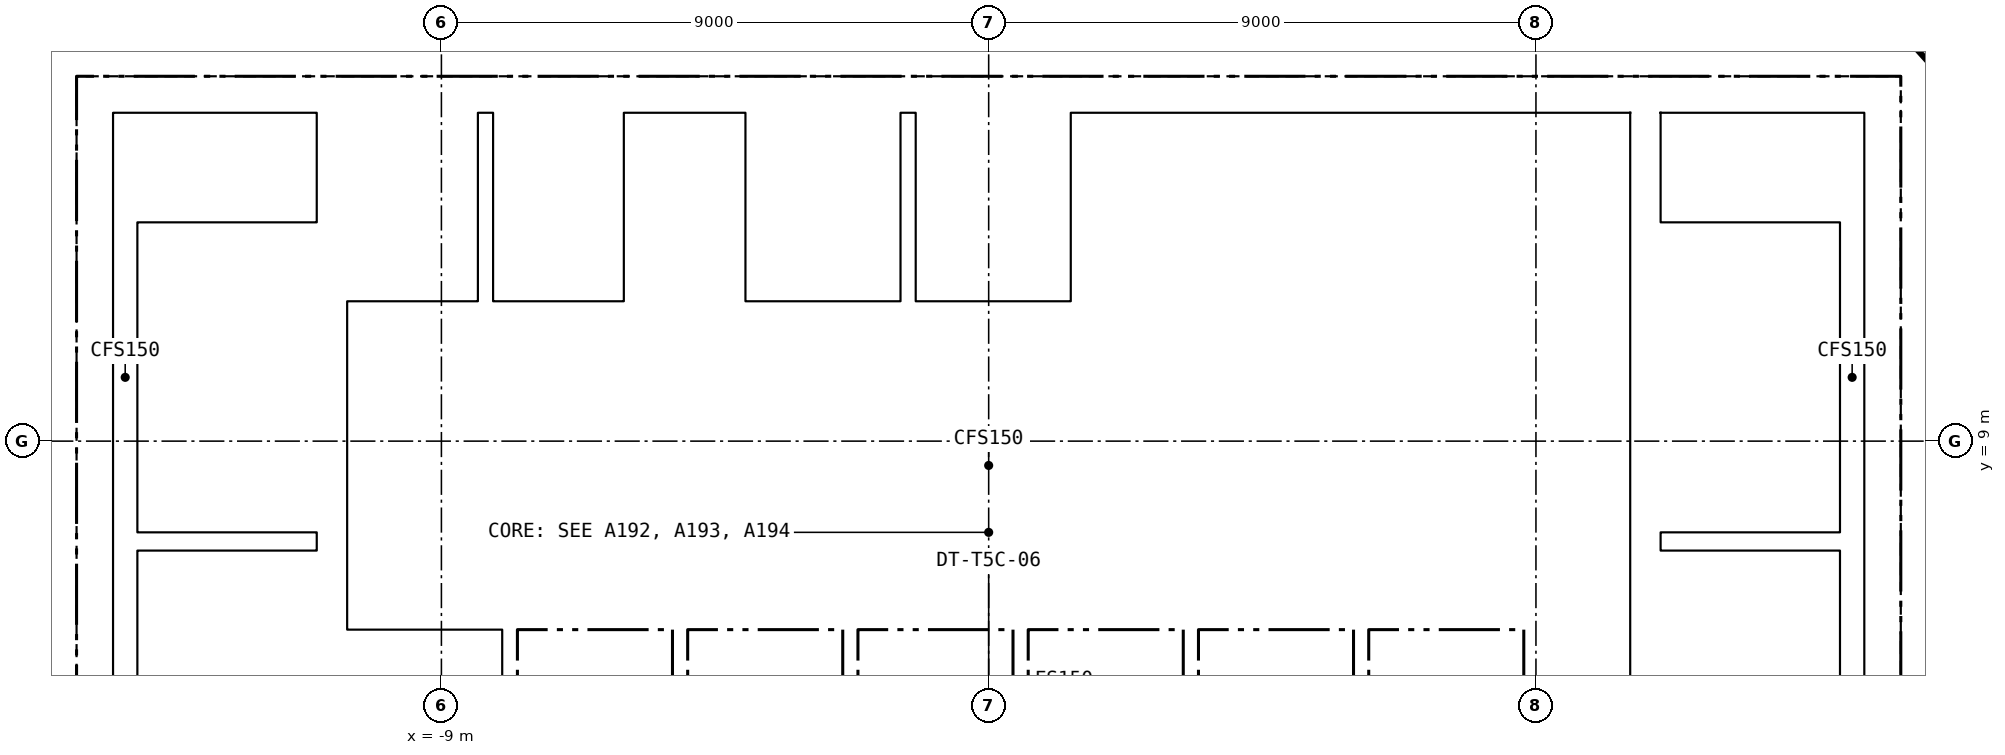
"""IFC4 building model, lengths in metres.
Left out: names, types, materials, properties, quantities, classifications, styles, units other than length and angle.
Written with IfcOpenShell. Run it as: python <this file> out.ifc"""

import sys

from ifc_helpers import new_model, si_unit, direction, frame, frame_2d, origin, place, context, subcontext, project, spatial, rectangle, extrude, element, fill, save


model = new_model("IFC4")
c1 = context("Model", 3, precision=1e-05, world=origin(), true_north=direction((0.0, 1.0)))
c2 = subcontext(c1, "Body", "Model", "MODEL_VIEW")
j1 = project(units=[si_unit("LENGTHUNIT", "METRE"), si_unit("PLANEANGLEUNIT", "RADIAN")], contexts=[c1])
p1 = place(None, origin())
s1 = spatial("IfcSite", under=j1, at=p1, CompositionType="ELEMENT")
p2 = place(p1, origin())
s2 = spatial("IfcBuilding", under=s1, at=p2, CompositionType="ELEMENT")
p3 = place(p2, frame((0.0, 0.0, 238.2)))
s3 = spatial("IfcBuildingStorey", under=s2, at=p3, CompositionType="ELEMENT", Elevation=238.2)
p4 = place(p3, frame((-15.0, 14.7, -0.15), z_axis=(0.0, 0.0, 1.0), x_axis=(1.0, 0.0, 0.0)))
e1 = element("IfcWall", 1, at=p4, inside=s3, PredefinedType="SOLIDWALL", context=c2, shape_type="SweptSolid", body=[
    extrude(rectangle(XDim=30.0, YDim=0.6, at=frame_2d((15.0, 0.0))), origin(), (0.0, 0.0, 1.0), 3.65),
])
p5 = place(p4, frame((9.25, 0.0, 0.15)))
e2 = element("IfcOpeningElement", 2, at=p5, cuts=e1, PredefinedType="OPENING", context=c2, shape_type="SweptSolid", body=[
    extrude(rectangle(XDim=1.5, YDim=2.1, at=frame_2d((0.75, 1.05))), frame((0.0, 0.31, 0.0), z_axis=(0.0, -1.0, 0.0), x_axis=(1.0, 0.0, 0.0)), (0.0, 0.0, 1.0), 0.62),
])
p6 = place(p4, frame((19.4, 0.0, 0.15)))
e3 = element("IfcOpeningElement", 3, at=p6, cuts=e1, PredefinedType="OPENING", context=c2, shape_type="SweptSolid", body=[
    extrude(rectangle(XDim=1.5, YDim=2.1, at=frame_2d((0.75, 1.05))), frame((0.0, 0.31, 0.0), z_axis=(0.0, -1.0, 0.0), x_axis=(1.0, 0.0, 0.0)), (0.0, 0.0, 1.0), 0.62),
])
p7 = place(p4, frame((1.5, 0.0, 0.15)))
e4 = element("IfcOpeningElement", 4, at=p7, cuts=e1, PredefinedType="OPENING", context=c2, shape_type="SweptSolid", body=[
    extrude(rectangle(XDim=1.2, YDim=2.1, at=frame_2d((0.6, 1.05))), frame((0.0, 0.31, 0.0), z_axis=(0.0, -1.0, 0.0), x_axis=(1.0, 0.0, 0.0)), (0.0, 0.0, 1.0), 0.62),
])
p8 = place(p4, frame((27.3, 0.0, 0.15)))
e5 = element("IfcOpeningElement", 5, at=p8, cuts=e1, PredefinedType="OPENING", context=c2, shape_type="SweptSolid", body=[
    extrude(rectangle(XDim=1.2, YDim=2.1, at=frame_2d((0.6, 1.05))), frame((0.0, 0.31, 0.0), z_axis=(0.0, -1.0, 0.0), x_axis=(1.0, 0.0, 0.0)), (0.0, 0.0, 1.0), 0.62),
])
for number, where, z_axis, x_axis in (
    (6, (-14.7, 0.6, -0.15), (0.0, 0.0, 1.0), (0.0, 1.0, 0.0)),
    (7, (14.7, 0.6, -0.15), (0.0, 0.0, 1.0), (0.0, 1.0, 0.0)),
):
    element("IfcWall", number, at=place(p3, frame(where, z_axis=z_axis, x_axis=x_axis)), inside=s3, PredefinedType="SOLIDWALL", context=c2, shape_type="SweptSolid", body=[
        extrude(rectangle(XDim=13.8, YDim=0.6, at=frame_2d((6.9, 0.0))), origin(), (0.0, 0.0, 1.0), 3.65),
    ])
for number, where, z_axis, x_axis in (
    (8, (-10.8, 0.6, -0.15), (0.0, 0.0, 1.0), (0.0, 1.0, 0.0)),
    (9, (10.8, 0.6, -0.15), (0.0, 0.0, 1.0), (0.0, 1.0, 0.0)),
):
    element("IfcWall", number, at=place(p3, frame(where, z_axis=z_axis, x_axis=x_axis)), inside=s3, PredefinedType="SOLIDWALL", context=c2, shape_type="SweptSolid", body=[
        extrude(rectangle(XDim=13.8, YDim=0.5, at=frame_2d((6.9, 0.0))), origin(), (0.0, 0.0, 1.0), 3.65),
    ])
p9 = place(p3, frame((-10.55, 6.025, 0.0), z_axis=(0.0, 0.0, 1.0), x_axis=(1.0, 0.0, 0.0)))
e10 = element("IfcWall", 10, at=p9, inside=s3, PredefinedType="PARTITIONING", context=c2, shape_type="SweptSolid", body=[
    extrude(rectangle(XDim=21.1, YDim=0.25, at=frame_2d((10.55, 0.0))), origin(), (0.0, 0.0, 1.0), 3.5),
])
p10 = place(p3, frame((-4.125, 8.55, 0.0), z_axis=(0.0, 0.0, 1.0), x_axis=(1.0, 0.0, 0.0)))
e11 = element("IfcWall", 11, at=p10, inside=s3, PredefinedType="PARTITIONING", context=c2, shape_type="SweptSolid", body=[
    extrude(rectangle(XDim=14.675, YDim=0.2, at=frame_2d((7.337, 0.0))), origin(), (0.0, 0.0, 1.0), 3.5),
])
p11 = place(p10, frame((1.413, 0.0, 0.0)))
e12 = element("IfcOpeningElement", 12, at=p11, cuts=e11, PredefinedType="OPENING", context=c2, shape_type="SweptSolid", body=[
    extrude(rectangle(XDim=1.0, YDim=2.1, at=frame_2d((0.5, 1.05))), frame((0.0, 0.11, 0.0), z_axis=(0.0, -1.0, 0.0), x_axis=(1.0, 0.0, 0.0)), (0.0, 0.0, 1.0), 0.22),
])
p12 = place(p10, frame((5.0, 0.0, 0.0)))
e13 = element("IfcOpeningElement", 13, at=p12, cuts=e11, PredefinedType="OPENING", context=c2, shape_type="SweptSolid", body=[
    extrude(rectangle(XDim=1.0, YDim=2.1, at=frame_2d((0.5, 1.05))), frame((0.0, 0.11, 0.0), z_axis=(0.0, -1.0, 0.0), x_axis=(1.0, 0.0, 0.0)), (0.0, 0.0, 1.0), 0.22),
])
p13 = place(p10, frame((9.613, 0.0, 0.0)))
e14 = element("IfcOpeningElement", 14, at=p13, cuts=e11, PredefinedType="OPENING", context=c2, shape_type="SweptSolid", body=[
    extrude(rectangle(XDim=1.0, YDim=2.1, at=frame_2d((0.5, 1.05))), frame((0.0, 0.11, 0.0), z_axis=(0.0, -1.0, 0.0), x_axis=(1.0, 0.0, 0.0)), (0.0, 0.0, 1.0), 0.22),
])
p14 = place(p10, frame((13.475, 0.0, 0.0)))
e15 = element("IfcOpeningElement", 15, at=p14, cuts=e11, PredefinedType="OPENING", context=c2, shape_type="SweptSolid", body=[
    extrude(rectangle(XDim=0.9, YDim=2.1, at=frame_2d((0.45, 1.05))), frame((0.0, 0.11, 0.0), z_axis=(0.0, -1.0, 0.0), x_axis=(1.0, 0.0, 0.0)), (0.0, 0.0, 1.0), 0.22),
])
p15 = place(p3, frame((-10.55, 11.2, 0.0), z_axis=(0.0, 0.0, 1.0), x_axis=(1.0, 0.0, 0.0)))
e16 = element("IfcWall", 16, at=p15, inside=s3, PredefinedType="PARTITIONING", context=c2, shape_type="SweptSolid", body=[
    extrude(rectangle(XDim=4.8, YDim=0.2, at=frame_2d((2.4, 0.0))), origin(), (0.0, 0.0, 1.0), 3.5),
])
p16 = place(p15, frame((0.525, 0.0, 0.0)))
e17 = element("IfcOpeningElement", 17, at=p16, cuts=e16, PredefinedType="OPENING", context=c2, shape_type="SweptSolid", body=[
    extrude(rectangle(XDim=1.1, YDim=2.1, at=frame_2d((0.55, 1.05))), frame((0.0, 0.11, 0.0), z_axis=(0.0, -1.0, 0.0), x_axis=(1.0, 0.0, 0.0)), (0.0, 0.0, 1.0), 0.22),
])
p17 = place(p15, frame((2.925, 0.0, 0.0)))
e18 = element("IfcOpeningElement", 18, at=p17, cuts=e16, PredefinedType="OPENING", context=c2, shape_type="SweptSolid", body=[
    extrude(rectangle(XDim=1.1, YDim=2.1, at=frame_2d((0.55, 1.05))), frame((0.0, 0.11, 0.0), z_axis=(0.0, -1.0, 0.0), x_axis=(1.0, 0.0, 0.0)), (0.0, 0.0, 1.0), 0.22),
])
p18 = place(p3, frame((-4.25, 11.2, 0.0), z_axis=(0.0, 0.0, 1.0), x_axis=(1.0, 0.0, 0.0)))
e19 = element("IfcWall", 19, at=p18, inside=s3, PredefinedType="PARTITIONING", context=c2, shape_type="SweptSolid", body=[
    extrude(rectangle(XDim=8.65, YDim=0.2, at=frame_2d((4.325, 0.0))), origin(), (0.0, 0.0, 1.0), 3.5),
])
p19 = place(p18, frame((0.825, 0.0, 0.0)))
e20 = element("IfcOpeningElement", 20, at=p19, cuts=e19, PredefinedType="OPENING", context=c2, shape_type="SweptSolid", body=[
    extrude(rectangle(XDim=1.4, YDim=2.1, at=frame_2d((0.7, 1.05))), frame((0.0, 0.11, 0.0), z_axis=(0.0, -1.0, 0.0), x_axis=(1.0, 0.0, 0.0)), (0.0, 0.0, 1.0), 0.22),
])
p20 = place(p18, frame((3.625, 0.0, 0.0)))
e21 = element("IfcOpeningElement", 21, at=p20, cuts=e19, PredefinedType="OPENING", context=c2, shape_type="SweptSolid", body=[
    extrude(rectangle(XDim=1.4, YDim=2.1, at=frame_2d((0.7, 1.05))), frame((0.0, 0.11, 0.0), z_axis=(0.0, -1.0, 0.0), x_axis=(1.0, 0.0, 0.0)), (0.0, 0.0, 1.0), 0.22),
])
p21 = place(p18, frame((6.675, 0.0, 0.0)))
e22 = element("IfcOpeningElement", 22, at=p21, cuts=e19, PredefinedType="OPENING", context=c2, shape_type="SweptSolid", body=[
    extrude(rectangle(XDim=0.9, YDim=2.1, at=frame_2d((0.45, 1.05))), frame((0.0, 0.11, 0.0), z_axis=(0.0, -1.0, 0.0), x_axis=(1.0, 0.0, 0.0)), (0.0, 0.0, 1.0), 0.22),
])
p22 = place(p3, frame((5.9, 11.2, 0.0), z_axis=(0.0, 0.0, 1.0), x_axis=(1.0, 0.0, 0.0)))
e23 = element("IfcWall", 23, at=p22, inside=s3, PredefinedType="PARTITIONING", context=c2, shape_type="SweptSolid", body=[
    extrude(rectangle(XDim=4.65, YDim=0.2, at=frame_2d((2.325, 0.0))), origin(), (0.0, 0.0, 1.0), 3.5),
])
p23 = place(p22, frame((1.025, 0.0, 0.0)))
e24 = element("IfcOpeningElement", 24, at=p23, cuts=e23, PredefinedType="OPENING", context=c2, shape_type="SweptSolid", body=[
    extrude(rectangle(XDim=1.0, YDim=2.1, at=frame_2d((0.5, 1.05))), frame((0.0, 0.11, 0.0), z_axis=(0.0, -1.0, 0.0), x_axis=(1.0, 0.0, 0.0)), (0.0, 0.0, 1.0), 0.22),
])
p24 = place(p22, frame((3.4, 0.0, 0.0)))
e25 = element("IfcOpeningElement", 25, at=p24, cuts=e23, PredefinedType="OPENING", context=c2, shape_type="SweptSolid", body=[
    extrude(rectangle(XDim=0.9, YDim=2.1, at=frame_2d((0.45, 1.05))), frame((0.0, 0.11, 0.0), z_axis=(0.0, -1.0, 0.0), x_axis=(1.0, 0.0, 0.0)), (0.0, 0.0, 1.0), 0.22),
])
p25 = place(p3, frame((-4.125, 6.15, 0.0), z_axis=(0.0, 0.0, 1.0), x_axis=(0.0, 1.0, 0.0)))
e26 = element("IfcWall", 26, at=p25, inside=s3, PredefinedType="PARTITIONING", context=c2, shape_type="SweptSolid", body=[
    extrude(rectangle(XDim=4.95, YDim=0.25, at=frame_2d((2.475, 0.0))), origin(), (0.0, 0.0, 1.0), 3.5),
])
p26 = place(p25, frame((3.125, 0.0, 0.0)))
e27 = element("IfcOpeningElement", 27, at=p26, cuts=e26, PredefinedType="OPENING", context=c2, shape_type="SweptSolid", body=[
    extrude(rectangle(XDim=1.2, YDim=2.1, at=frame_2d((0.6, 1.05))), frame((0.0, 0.135, 0.0), z_axis=(0.0, -1.0, 0.0), x_axis=(1.0, 0.0, 0.0)), (0.0, 0.0, 1.0), 0.27),
])
for number, where, z_axis, x_axis in (
    (28, (-7.875, 3.6, 0.0), (0.0, 0.0, 1.0), (0.0, 1.0, 0.0)),
    (29, (-5.075, 3.6, 0.0), (0.0, 0.0, 1.0), (0.0, 1.0, 0.0)),
    (30, (-2.275, 3.6, 0.0), (0.0, 0.0, 1.0), (0.0, 1.0, 0.0)),
    (31, (0.525, 3.6, 0.0), (0.0, 0.0, 1.0), (0.0, 1.0, 0.0)),
    (32, (3.325, 3.6, 0.0), (0.0, 0.0, 1.0), (0.0, 1.0, 0.0)),
    (33, (6.125, 3.6, 0.0), (0.0, 0.0, 1.0), (0.0, 1.0, 0.0)),
    (34, (8.925, 3.6, 0.0), (0.0, 0.0, 1.0), (0.0, 1.0, 0.0)),
):
    element("IfcWall", number, at=place(p3, frame(where, z_axis=z_axis, x_axis=x_axis)), inside=s3, PredefinedType="PARTITIONING", context=c2, shape_type="SweptSolid", body=[
        extrude(rectangle(XDim=2.3, YDim=0.25, at=frame_2d((1.15, 0.0))), origin(), (0.0, 0.0, 1.0), 3.5),
    ])
for number, where, z_axis, x_axis in (
    (35, (-0.35, 6.15, 0.0), (0.0, 0.0, 1.0), (0.0, 1.0, 0.0)),
    (36, (3.1, 6.15, 0.0), (0.0, 0.0, 1.0), (0.0, 1.0, 0.0)),
):
    element("IfcWall", number, at=place(p3, frame(where, z_axis=z_axis, x_axis=x_axis)), inside=s3, PredefinedType="PARTITIONING", context=c2, shape_type="SweptSolid", body=[
        extrude(rectangle(XDim=2.3, YDim=0.15, at=frame_2d((1.15, 0.0))), origin(), (0.0, 0.0, 1.0), 3.5),
    ])
p27 = place(p3, frame((8.925, 6.15, 0.0), z_axis=(0.0, 0.0, 1.0), x_axis=(0.0, 1.0, 0.0)))
e37 = element("IfcWall", 37, at=p27, inside=s3, PredefinedType="PARTITIONING", context=c2, shape_type="SweptSolid", body=[
    extrude(rectangle(XDim=2.3, YDim=0.25, at=frame_2d((1.15, 0.0))), origin(), (0.0, 0.0, 1.0), 3.5),
])
for number, where, z_axis, x_axis in (
    (38, (-8.275, 11.3, 0.0), (0.0, 0.0, 1.0), (0.0, 1.0, 0.0)),
    (39, (-5.875, 11.3, 0.0), (0.0, 0.0, 1.0), (0.0, 1.0, 0.0)),
    (40, (-4.125, 11.3, 0.0), (0.0, 0.0, 1.0), (0.0, 1.0, 0.0)),
    (41, (-1.325, 11.3, 0.0), (0.0, 0.0, 1.0), (0.0, 1.0, 0.0)),
    (42, (1.475, 11.3, 0.0), (0.0, 0.0, 1.0), (0.0, 1.0, 0.0)),
    (43, (4.275, 11.3, 0.0), (0.0, 0.0, 1.0), (0.0, 1.0, 0.0)),
    (44, (6.025, 11.3, 0.0), (0.0, 0.0, 1.0), (0.0, 1.0, 0.0)),
    (45, (8.825, 11.3, 0.0), (0.0, 0.0, 1.0), (0.0, 1.0, 0.0)),
):
    element("IfcWall", number, at=place(p3, frame(where, z_axis=z_axis, x_axis=x_axis)), inside=s3, PredefinedType="PARTITIONING", context=c2, shape_type="SweptSolid", body=[
        extrude(rectangle(XDim=3.1, YDim=0.25, at=frame_2d((1.55, 0.0))), origin(), (0.0, 0.0, 1.0), 3.5),
    ])
p28 = place(p3, frame((-14.0, 7.35, 0.0), z_axis=(0.0, 0.0, 1.0), x_axis=(1.0, 0.0, 0.0)))
e46 = element("IfcWall", 46, at=p28, inside=s3, PredefinedType="SOLIDWALL", context=c2, shape_type="SweptSolid", body=[
    extrude(rectangle(XDim=2.95, YDim=0.3, at=frame_2d((1.475, 0.0))), origin(), (0.0, 0.0, 1.0), 3.5),
])
p29 = place(p3, frame((-14.2, 0.6, 0.0), z_axis=(0.0, 0.0, 1.0), x_axis=(0.0, 1.0, 0.0)))
e47 = element("IfcWall", 47, at=p29, inside=s3, PredefinedType="SOLIDWALL", context=c2, shape_type="SweptSolid", body=[
    extrude(rectangle(XDim=13.8, YDim=0.4, at=frame_2d((6.9, 0.0))), origin(), (0.0, 0.0, 1.0), 3.5),
])
p30 = place(p3, frame((11.05, 7.35, 0.0), z_axis=(0.0, 0.0, 1.0), x_axis=(1.0, 0.0, 0.0)))
e48 = element("IfcWall", 48, at=p30, inside=s3, PredefinedType="SOLIDWALL", context=c2, shape_type="SweptSolid", body=[
    extrude(rectangle(XDim=2.95, YDim=0.3, at=frame_2d((1.475, 0.0))), origin(), (0.0, 0.0, 1.0), 3.5),
])
p31 = place(p3, frame((14.2, 0.6, 0.0), z_axis=(0.0, 0.0, 1.0), x_axis=(0.0, 1.0, 0.0)))
e49 = element("IfcWall", 49, at=p31, inside=s3, PredefinedType="SOLIDWALL", context=c2, shape_type="SweptSolid", body=[
    extrude(rectangle(XDim=13.8, YDim=0.4, at=frame_2d((6.9, 0.0))), origin(), (0.0, 0.0, 1.0), 3.5),
])
p32 = place(p3, frame((14.476, 16.433, 0.0), z_axis=(0.0, 0.0, 1.0), x_axis=(0.669119130918, -0.74315515785, 0.0)))
e50 = element("IfcWall", 50, at=p32, inside=s3, PredefinedType="PARTITIONING", context=c2, shape_type="SweptSolid", body=[
    extrude(rectangle(XDim=4.28, YDim=0.15, at=frame_2d((2.14, 0.0))), origin(), (0.0, 0.0, 1.0), 2.751),
])
p33 = place(p26, origin())
e51 = element("IfcDoor", 51, at=p33, inside=s3, OperationType="SINGLE_SWING_LEFT", PredefinedType="DOOR", context=c2, shape_type="SweptSolid", body=[
    extrude(rectangle(XDim=1.2, YDim=2.1, at=frame_2d((0.6, 1.05))), frame((0.0, 0.025, 0.0), z_axis=(0.0, -1.0, 0.0), x_axis=(1.0, 0.0, 0.0)), (0.0, 0.0, 1.0), 0.05),
])
fill(e27, e51)
p34 = place(p11, origin())
e52 = element("IfcDoor", 52, at=p34, inside=s3, OperationType="SINGLE_SWING_LEFT", PredefinedType="DOOR", context=c2, shape_type="SweptSolid", body=[
    extrude(rectangle(XDim=1.0, YDim=2.1, at=frame_2d((0.5, 1.05))), frame((0.0, 0.025, 0.0), z_axis=(0.0, -1.0, 0.0), x_axis=(1.0, 0.0, 0.0)), (0.0, 0.0, 1.0), 0.05),
])
fill(e12, e52)
p35 = place(p12, origin())
e53 = element("IfcDoor", 53, at=p35, inside=s3, OperationType="SINGLE_SWING_RIGHT", PredefinedType="DOOR", context=c2, shape_type="SweptSolid", body=[
    extrude(rectangle(XDim=1.0, YDim=2.1, at=frame_2d((0.5, 1.05))), frame((0.0, 0.025, 0.0), z_axis=(0.0, -1.0, 0.0), x_axis=(1.0, 0.0, 0.0)), (0.0, 0.0, 1.0), 0.05),
])
fill(e13, e53)
p36 = place(p13, origin())
e54 = element("IfcDoor", 54, at=p36, inside=s3, OperationType="SINGLE_SWING_LEFT", PredefinedType="DOOR", context=c2, shape_type="SweptSolid", body=[
    extrude(rectangle(XDim=1.0, YDim=2.1, at=frame_2d((0.5, 1.05))), frame((0.0, 0.025, 0.0), z_axis=(0.0, -1.0, 0.0), x_axis=(1.0, 0.0, 0.0)), (0.0, 0.0, 1.0), 0.05),
])
fill(e14, e54)
p37 = place(p14, origin())
e55 = element("IfcDoor", 55, at=p37, inside=s3, OperationType="SINGLE_SWING_RIGHT", PredefinedType="DOOR", context=c2, shape_type="SweptSolid", body=[
    extrude(rectangle(XDim=0.9, YDim=2.1, at=frame_2d((0.45, 1.05))), frame((0.0, 0.025, 0.0), z_axis=(0.0, -1.0, 0.0), x_axis=(1.0, 0.0, 0.0)), (0.0, 0.0, 1.0), 0.05),
])
fill(e15, e55)
p38 = place(p16, origin())
e56 = element("IfcDoor", 56, at=p38, inside=s3, OperationType="DOUBLE_DOOR_SLIDING", PredefinedType="DOOR", context=c2, shape_type="SweptSolid", body=[
    extrude(rectangle(XDim=1.1, YDim=2.1, at=frame_2d((0.55, 1.05))), frame((0.0, 0.025, 0.0), z_axis=(0.0, -1.0, 0.0), x_axis=(1.0, 0.0, 0.0)), (0.0, 0.0, 1.0), 0.05),
])
fill(e17, e56)
p39 = place(p17, origin())
e57 = element("IfcDoor", 57, at=p39, inside=s3, OperationType="DOUBLE_DOOR_SLIDING", PredefinedType="DOOR", context=c2, shape_type="SweptSolid", body=[
    extrude(rectangle(XDim=1.1, YDim=2.1, at=frame_2d((0.55, 1.05))), frame((0.0, 0.025, 0.0), z_axis=(0.0, -1.0, 0.0), x_axis=(1.0, 0.0, 0.0)), (0.0, 0.0, 1.0), 0.05),
])
fill(e18, e57)
p40 = place(p19, origin())
e58 = element("IfcDoor", 58, at=p40, inside=s3, OperationType="DOUBLE_DOOR_SLIDING", PredefinedType="DOOR", context=c2, shape_type="SweptSolid", body=[
    extrude(rectangle(XDim=1.4, YDim=2.1, at=frame_2d((0.7, 1.05))), frame((0.0, 0.025, 0.0), z_axis=(0.0, -1.0, 0.0), x_axis=(1.0, 0.0, 0.0)), (0.0, 0.0, 1.0), 0.05),
])
fill(e20, e58)
p41 = place(p20, origin())
e59 = element("IfcDoor", 59, at=p41, inside=s3, OperationType="DOUBLE_DOOR_SLIDING", PredefinedType="DOOR", context=c2, shape_type="SweptSolid", body=[
    extrude(rectangle(XDim=1.4, YDim=2.1, at=frame_2d((0.7, 1.05))), frame((0.0, 0.025, 0.0), z_axis=(0.0, -1.0, 0.0), x_axis=(1.0, 0.0, 0.0)), (0.0, 0.0, 1.0), 0.05),
])
fill(e21, e59)
p42 = place(p21, origin())
e60 = element("IfcDoor", 60, at=p42, inside=s3, OperationType="SINGLE_SWING_LEFT", PredefinedType="DOOR", context=c2, shape_type="SweptSolid", body=[
    extrude(rectangle(XDim=0.9, YDim=2.1, at=frame_2d((0.45, 1.05))), frame((0.0, 0.025, 0.0), z_axis=(0.0, -1.0, 0.0), x_axis=(1.0, 0.0, 0.0)), (0.0, 0.0, 1.0), 0.05),
])
fill(e22, e60)
p43 = place(p23, origin())
e61 = element("IfcDoor", 61, at=p43, inside=s3, OperationType="SINGLE_SWING_RIGHT", PredefinedType="DOOR", context=c2, shape_type="SweptSolid", body=[
    extrude(rectangle(XDim=1.0, YDim=2.1, at=frame_2d((0.5, 1.05))), frame((0.0, 0.025, 0.0), z_axis=(0.0, -1.0, 0.0), x_axis=(1.0, 0.0, 0.0)), (0.0, 0.0, 1.0), 0.05),
])
fill(e24, e61)
p44 = place(p24, origin())
e62 = element("IfcDoor", 62, at=p44, inside=s3, OperationType="SINGLE_SWING_LEFT", PredefinedType="DOOR", context=c2, shape_type="SweptSolid", body=[
    extrude(rectangle(XDim=0.9, YDim=2.1, at=frame_2d((0.45, 1.05))), frame((0.0, 0.025, 0.0), z_axis=(0.0, -1.0, 0.0), x_axis=(1.0, 0.0, 0.0)), (0.0, 0.0, 1.0), 0.05),
])
fill(e25, e62)
p45 = place(p5, origin())
e63 = element("IfcDoor", 63, at=p45, inside=s3, OperationType="DOUBLE_DOOR_SINGLE_SWING", PredefinedType="DOOR", context=c2, shape_type="SweptSolid", body=[
    extrude(rectangle(XDim=1.5, YDim=2.1, at=frame_2d((0.75, 1.05))), frame((0.0, 0.025, 0.0), z_axis=(0.0, -1.0, 0.0), x_axis=(1.0, 0.0, 0.0)), (0.0, 0.0, 1.0), 0.05),
])
fill(e2, e63)
p46 = place(p6, origin())
e64 = element("IfcDoor", 64, at=p46, inside=s3, OperationType="DOUBLE_DOOR_SINGLE_SWING", PredefinedType="DOOR", context=c2, shape_type="SweptSolid", body=[
    extrude(rectangle(XDim=1.5, YDim=2.1, at=frame_2d((0.75, 1.05))), frame((0.0, 0.025, 0.0), z_axis=(0.0, -1.0, 0.0), x_axis=(1.0, 0.0, 0.0)), (0.0, 0.0, 1.0), 0.05),
])
fill(e3, e64)
p47 = place(p7, origin())
e65 = element("IfcDoor", 65, at=p47, inside=s3, OperationType="SINGLE_SWING_RIGHT", PredefinedType="DOOR", context=c2, shape_type="SweptSolid", body=[
    extrude(rectangle(XDim=1.2, YDim=2.1, at=frame_2d((0.6, 1.05))), frame((0.0, 0.025, 0.0), z_axis=(0.0, -1.0, 0.0), x_axis=(1.0, 0.0, 0.0)), (0.0, 0.0, 1.0), 0.05),
])
fill(e4, e65)
p48 = place(p8, origin())
e66 = element("IfcDoor", 66, at=p48, inside=s3, OperationType="SINGLE_SWING_LEFT", PredefinedType="DOOR", context=c2, shape_type="SweptSolid", body=[
    extrude(rectangle(XDim=1.2, YDim=2.1, at=frame_2d((0.6, 1.05))), frame((0.0, 0.025, 0.0), z_axis=(0.0, -1.0, 0.0), x_axis=(1.0, 0.0, 0.0)), (0.0, 0.0, 1.0), 0.05),
])
fill(e5, e66)
save(model, sys.argv[1])
